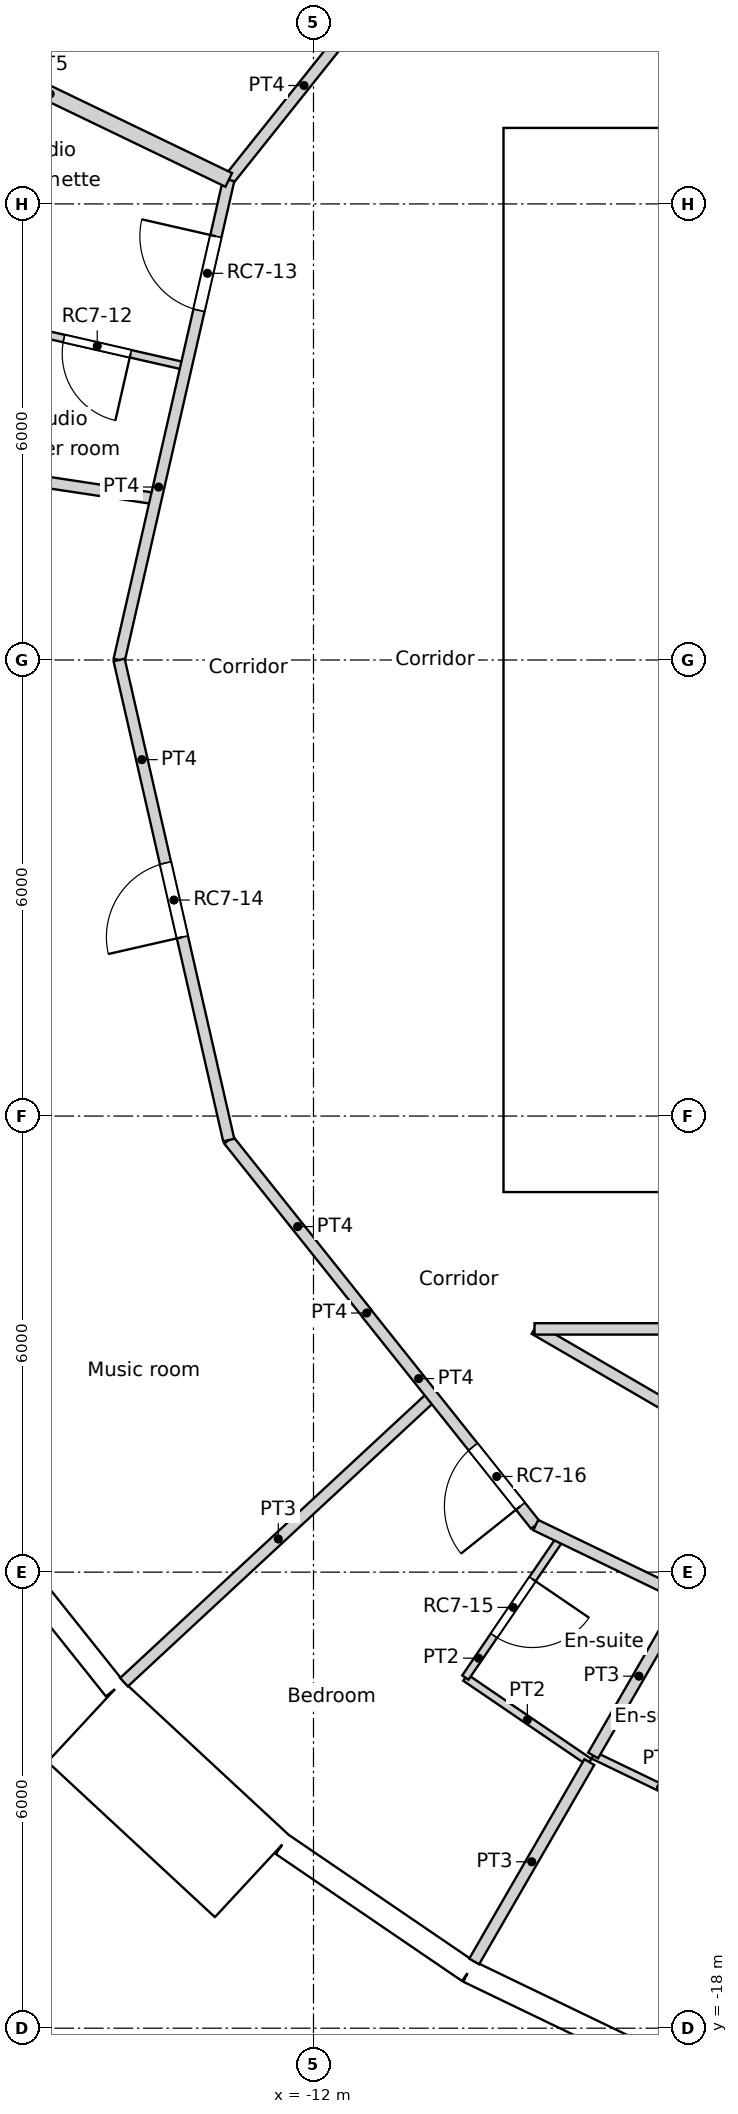
"""IFC4 building model, lengths in metres.
Left out: names, types, materials, properties, quantities, classifications, styles, units other than length and angle.
Written with IfcOpenShell. Run it as: python <this file> out.ifc"""

import sys

from ifc_helpers import new_model, si_unit, direction, frame, frame_2d, origin, origin_2d, place, context, subcontext, project, spatial, rectangle, circle, extrude, element, fill, save


model = new_model("IFC4")
c1 = context("Model", 3, precision=1e-05, world=origin(), true_north=direction((0.0, 1.0)))
c2 = subcontext(c1, "Body", "Model", "MODEL_VIEW")
j1 = project(units=[si_unit("LENGTHUNIT", "METRE"), si_unit("PLANEANGLEUNIT", "RADIAN")], contexts=[c1])
p1 = place(None, origin())
s1 = spatial("IfcSite", under=j1, at=p1, CompositionType="ELEMENT")
p2 = place(p1, origin())
s2 = spatial("IfcBuilding", under=s1, at=p2, CompositionType="ELEMENT")
p3 = place(p2, frame((0.0, 0.0, 294.6)))
s3 = spatial("IfcBuildingStorey", under=s2, at=p3, CompositionType="ELEMENT", Elevation=294.6)
for number, where, z_axis, x_axis in (
    (1, (-13.798, -12.802, 0.0), (0.0, 0.0, 1.0), (1.0, 0.0, 0.0)),
    (2, (-9.411, -16.301, 0.0), (0.0, 0.0, 1.0), (1.0, 0.0, 0.0)),
):
    element("IfcColumn", number, at=place(p3, frame(where, z_axis=z_axis, x_axis=x_axis)), inside=s3, PredefinedType="COLUMN", context=c2, shape_type="SweptSolid", body=[
        extrude(circle(Radius=0.45, at=origin_2d()), origin(), (0.0, 0.0, 1.0), 3.6),
    ])
p4 = place(p3, frame((-16.46, -11.222, 0.0), z_axis=(0.0, 0.0, 1.0), x_axis=(0.623498236992, -0.781824755599, 0.0)))
e3 = element("IfcWall", 3, at=p4, inside=s3, PredefinedType="SOLIDWALL", context=c2, shape_type="SweptSolid", body=[
    extrude(rectangle(XDim=2.962, YDim=0.3, at=frame_2d((1.481, 0.0))), origin(), (0.0, 0.0, 1.0), 3.25),
])
p5 = place(p4, frame((1.481, 0.0, 1.55)))
e4 = element("IfcOpeningElement", 4, at=p5, cuts=e3, PredefinedType="OPENING", context=c2, shape_type="SweptSolid", body=[
    extrude(circle(Radius=0.9, at=origin_2d()), frame((0.0, 0.16, 0.0), z_axis=(0.0, -1.0, 0.0), x_axis=(1.0, 0.0, 0.0)), (0.0, 0.0, 1.0), 0.32),
])
p6 = place(p3, frame((-15.003, -13.964, -0.35), z_axis=(0.0, 0.0, 1.0), x_axis=(0.733022439167, -0.680204457261, 0.0)))
e5 = element("IfcWall", 5, at=p6, inside=s3, PredefinedType="ELEMENTEDWALL", context=c2, shape_type="SweptSolid", body=[
    extrude(rectangle(XDim=3.0, YDim=1.45, at=frame_2d((1.5, 0.0))), origin(), (0.0, 0.0, 1.0), 3.6),
])
p7 = place(p6, frame((1.5, 0.0, 1.9)))
e6 = element("IfcOpeningElement", 6, at=p7, cuts=e5, PredefinedType="OPENING", context=c2, shape_type="SweptSolid", body=[
    extrude(circle(Radius=0.9, at=origin_2d()), frame((0.0, 0.735, 0.0), z_axis=(0.0, -1.0, 0.0), x_axis=(1.0, 0.0, 0.0)), (0.0, 0.0, 1.0), 1.47),
])
p8 = place(p3, frame((-12.408, -15.584, 0.0), z_axis=(0.0, 0.0, 1.0), x_axis=(0.826236061068, -0.563324037646, 0.0)))
e7 = element("IfcWall", 7, at=p8, inside=s3, PredefinedType="SOLIDWALL", context=c2, shape_type="SweptSolid", body=[
    extrude(rectangle(XDim=2.962, YDim=0.3, at=frame_2d((1.481, 0.0))), origin(), (0.0, 0.0, 1.0), 3.25),
])
p9 = place(p8, frame((1.481, 0.0, 1.55)))
e8 = element("IfcOpeningElement", 8, at=p9, cuts=e7, PredefinedType="OPENING", context=c2, shape_type="SweptSolid", body=[
    extrude(circle(Radius=0.9, at=origin_2d()), frame((0.0, 0.16, 0.0), z_axis=(0.0, -1.0, 0.0), x_axis=(1.0, 0.0, 0.0)), (0.0, 0.0, 1.0), 0.32),
])
p10 = place(p3, frame((-9.961, -17.253, 0.0), z_axis=(0.0, 0.0, 1.0), x_axis=(0.90095513435, -0.433912255978, 0.0)))
e9 = element("IfcWall", 9, at=p10, inside=s3, PredefinedType="SOLIDWALL", context=c2, shape_type="SweptSolid", body=[
    extrude(rectangle(XDim=2.962, YDim=0.3, at=frame_2d((1.481, 0.0))), origin(), (0.0, 0.0, 1.0), 3.25),
])
p11 = place(p10, frame((1.481, 0.0, 1.55)))
e10 = element("IfcOpeningElement", 10, at=p11, cuts=e9, PredefinedType="OPENING", context=c2, shape_type="SweptSolid", body=[
    extrude(circle(Radius=0.9, at=origin_2d()), frame((0.0, 0.16, 0.0), z_axis=(0.0, -1.0, 0.0), x_axis=(1.0, 0.0, 0.0)), (0.0, 0.0, 1.0), 0.32),
])
p12 = place(p3, frame((-9.5, -6.7, 0.0), z_axis=(0.0, 0.0, 1.0), x_axis=(1.0, 0.0, 0.0)))
e11 = element("IfcWall", 11, at=p12, inside=s3, PredefinedType="SOLIDWALL", context=c2, shape_type="SweptSolid", body=[
    extrude(rectangle(XDim=19.0, YDim=0.6, at=frame_2d((9.5, 0.0))), origin(), (0.0, 0.0, 1.0), 3.6),
])
p13 = place(p12, frame((10.4, 0.0, 0.0)))
e12 = element("IfcOpeningElement", 12, at=p13, cuts=e11, PredefinedType="OPENING", context=c2, shape_type="SweptSolid", body=[
    extrude(rectangle(XDim=1.0, YDim=2.1, at=frame_2d((0.5, 1.05))), frame((0.0, 0.3, 0.0), z_axis=(0.0, -1.0, 0.0), x_axis=(1.0, 0.0, 0.0)), (0.0, 0.0, 1.0), 0.6),
])
p14 = place(p12, frame((5.35, 0.0, 0.0)))
e13 = element("IfcOpeningElement", 13, at=p14, cuts=e11, PredefinedType="OPENING", context=c2, shape_type="SweptSolid", body=[
    extrude(rectangle(XDim=1.7, YDim=2.1, at=frame_2d((0.85, 1.05))), frame((0.0, 0.3, 0.0), z_axis=(0.0, -1.0, 0.0), x_axis=(1.0, 0.0, 0.0)), (0.0, 0.0, 1.0), 0.6),
])
p15 = place(p12, frame((11.95, 0.0, 0.0)))
e14 = element("IfcOpeningElement", 14, at=p15, cuts=e11, PredefinedType="OPENING", context=c2, shape_type="SweptSolid", body=[
    extrude(rectangle(XDim=1.7, YDim=2.1, at=frame_2d((0.85, 1.05))), frame((0.0, 0.3, 0.0), z_axis=(0.0, -1.0, 0.0), x_axis=(1.0, 0.0, 0.0)), (0.0, 0.0, 1.0), 0.6),
])
p16 = place(p3, frame((-9.5, 6.7, 0.0), z_axis=(0.0, 0.0, 1.0), x_axis=(1.0, 0.0, 0.0)))
e15 = element("IfcWall", 15, at=p16, inside=s3, PredefinedType="SOLIDWALL", context=c2, shape_type="SweptSolid", body=[
    extrude(rectangle(XDim=19.0, YDim=0.6, at=frame_2d((9.5, 0.0))), origin(), (0.0, 0.0, 1.0), 3.6),
])
p17 = place(p16, frame((5.35, 0.0, 0.0)))
e16 = element("IfcOpeningElement", 16, at=p17, cuts=e15, PredefinedType="OPENING", context=c2, shape_type="SweptSolid", body=[
    extrude(rectangle(XDim=1.7, YDim=2.1, at=frame_2d((0.85, 1.05))), frame((0.0, 0.3, 0.0), z_axis=(0.0, -1.0, 0.0), x_axis=(1.0, 0.0, 0.0)), (0.0, 0.0, 1.0), 0.6),
])
p18 = place(p3, frame((-9.2, -6.4, 0.0), z_axis=(0.0, 0.0, 1.0), x_axis=(0.0, 1.0, 0.0)))
e17 = element("IfcWall", 17, at=p18, inside=s3, PredefinedType="SOLIDWALL", context=c2, shape_type="SweptSolid", body=[
    extrude(rectangle(XDim=12.8, YDim=0.6, at=frame_2d((6.4, 0.0))), origin(), (0.0, 0.0, 1.0), 3.6),
])
p19 = place(p3, frame((-8.9, -3.1, 0.0), z_axis=(0.0, 0.0, 1.0), x_axis=(1.0, 0.0, 0.0)))
e18 = element("IfcWall", 18, at=p19, inside=s3, PredefinedType="SOLIDWALL", context=c2, shape_type="SweptSolid", body=[
    extrude(rectangle(XDim=9.6, YDim=0.3, at=frame_2d((4.8, 0.0))), origin(), (0.0, 0.0, 1.0), 3.25),
])
p20 = place(p19, frame((4.75, 0.0, 0.0)))
e19 = element("IfcOpeningElement", 19, at=p20, cuts=e18, PredefinedType="OPENING", context=c2, shape_type="SweptSolid", body=[
    extrude(rectangle(XDim=1.7, YDim=2.1, at=frame_2d((0.85, 1.05))), frame((0.0, 0.15, 0.0), z_axis=(0.0, -1.0, 0.0), x_axis=(1.0, 0.0, 0.0)), (0.0, 0.0, 1.0), 0.3),
])
p21 = place(p3, frame((-8.9, 3.1, 0.0), z_axis=(0.0, 0.0, 1.0), x_axis=(1.0, 0.0, 0.0)))
e20 = element("IfcWall", 20, at=p21, inside=s3, PredefinedType="SOLIDWALL", context=c2, shape_type="SweptSolid", body=[
    extrude(rectangle(XDim=4.55, YDim=0.3, at=frame_2d((2.275, 0.0))), origin(), (0.0, 0.0, 1.0), 3.25),
])
p22 = place(p3, frame((-8.9, 0.0, 0.0), z_axis=(0.0, 0.0, 1.0), x_axis=(1.0, 0.0, 0.0)))
e21 = element("IfcWall", 21, at=p22, inside=s3, PredefinedType="SOLIDWALL", context=c2, shape_type="SweptSolid", body=[
    extrude(rectangle(XDim=3.0, YDim=0.3, at=frame_2d((1.5, 0.0))), origin(), (0.0, 0.0, 1.0), 3.25),
])
p23 = place(p3, frame((-9.092, -8.8, 0.0), z_axis=(0.0, 0.0, 1.0), x_axis=(1.0, 0.0, 0.0)))
e22 = element("IfcWall", 22, at=p23, inside=s3, PredefinedType="PARTITIONING", context=c2, shape_type="SweptSolid", body=[
    extrude(rectangle(XDim=10.016, YDim=0.15, at=frame_2d((5.008, 0.0))), origin(), (0.0, 0.0, 1.0), 3.25),
])
p24 = place(p23, frame((4.508, 0.0, 0.0)))
e23 = element("IfcOpeningElement", 23, at=p24, cuts=e22, PredefinedType="OPENING", context=c2, shape_type="SweptSolid", body=[
    extrude(rectangle(XDim=1.0, YDim=2.04, at=frame_2d((0.5, 1.02))), frame((0.0, 0.075, 0.0), z_axis=(0.0, -1.0, 0.0), x_axis=(1.0, 0.0, 0.0)), (0.0, 0.0, 1.0), 0.15),
])
p25 = place(p3, frame((-9.092, -8.8, 0.0), z_axis=(0.0, 0.0, 1.0), x_axis=(0.864470922103, -0.502682827277, 0.0)))
e24 = element("IfcWall", 24, at=p25, inside=s3, PredefinedType="PARTITIONING", context=c2, shape_type="SweptSolid", body=[
    extrude(rectangle(XDim=6.735, YDim=0.15, at=frame_2d((3.368, 0.0))), origin(), (0.0, 0.0, 1.0), 3.25),
])
p26 = place(p3, frame((-11.3, -8.596, 0.0), z_axis=(0.0, 0.0, 1.0), x_axis=(0.623390921228, -0.781910326911, 0.0)))
e25 = element("IfcWall", 25, at=p26, inside=s3, PredefinedType="PARTITIONING", context=c2, shape_type="SweptSolid", body=[
    extrude(rectangle(XDim=3.564, YDim=0.15, at=frame_2d((1.782, 0.0))), origin(), (0.0, 0.0, 1.0), 3.25),
])
p27 = place(p26, frame((2.244, 0.0, 0.0)))
e26 = element("IfcOpeningElement", 26, at=p27, cuts=e25, PredefinedType="OPENING", context=c2, shape_type="SweptSolid", body=[
    extrude(rectangle(XDim=1.0, YDim=2.1, at=frame_2d((0.5, 1.05))), frame((0.0, 0.075, 0.0), z_axis=(0.0, -1.0, 0.0), x_axis=(1.0, 0.0, 0.0)), (0.0, 0.0, 1.0), 0.15),
])
p28 = place(p3, frame((-11.3, -8.596, 0.0), z_axis=(0.0, 0.0, 1.0), x_axis=(0.0, 1.0, 0.0)))
e27 = element("IfcWall", 27, at=p28, inside=s3, PredefinedType="PARTITIONING", context=c2, shape_type="SweptSolid", body=[
    extrude(rectangle(XDim=0.01, YDim=0.15, at=frame_2d((0.005, 0.0))), origin(), (0.0, 0.0, 1.0), 3.25),
])
p29 = place(p3, frame((-13.115, 6.316, 0.0), z_axis=(0.0, 0.0, 1.0), x_axis=(0.623476099415, 0.781842409606, 0.0)))
e28 = element("IfcWall", 28, at=p29, inside=s3, PredefinedType="PARTITIONING", context=c2, shape_type="SweptSolid", body=[
    extrude(rectangle(XDim=3.177, YDim=0.15, at=frame_2d((1.589, 0.0))), origin(), (0.0, 0.0, 1.0), 3.25),
])
p30 = place(p3, frame((-14.557, 0.0, 0.0), z_axis=(0.0, 0.0, 1.0), x_axis=(0.222533159771, 0.974925121639, 0.0)))
e29 = element("IfcWall", 29, at=p30, inside=s3, PredefinedType="PARTITIONING", context=c2, shape_type="SweptSolid", body=[
    extrude(rectangle(XDim=6.478, YDim=0.15, at=frame_2d((3.239, 0.0))), origin(), (0.0, 0.0, 1.0), 3.25),
])
p31 = place(p30, frame((4.718, 0.0, 0.0)))
e30 = element("IfcOpeningElement", 30, at=p31, cuts=e29, PredefinedType="OPENING", context=c2, shape_type="SweptSolid", body=[
    extrude(rectangle(XDim=1.0, YDim=2.1, at=frame_2d((0.5, 1.05))), frame((0.0, 0.075, 0.0), z_axis=(0.0, -1.0, 0.0), x_axis=(1.0, 0.0, 0.0)), (0.0, 0.0, 1.0), 0.15),
])
p32 = place(p3, frame((-13.115, -6.316, 0.0), z_axis=(0.0, 0.0, 1.0), x_axis=(0.623446514299, -0.781866001185, 0.0)))
e31 = element("IfcWall", 31, at=p32, inside=s3, PredefinedType="PARTITIONING", context=c2, shape_type="SweptSolid", body=[
    extrude(rectangle(XDim=2.911, YDim=0.15, at=frame_2d((1.456, 0.0))), origin(), (0.0, 0.0, 1.0), 3.25),
])
p33 = place(p3, frame((-14.557, 0.0, 0.0), z_axis=(0.0, 0.0, 1.0), x_axis=(0.222568978642, -0.97491694505, 0.0)))
e32 = element("IfcWall", 32, at=p33, inside=s3, PredefinedType="PARTITIONING", context=c2, shape_type="SweptSolid", body=[
    extrude(rectangle(XDim=6.479, YDim=0.15, at=frame_2d((3.239, 0.0))), origin(), (0.0, 0.0, 1.0), 3.25),
])
p34 = place(p33, frame((2.74, 0.0, 0.0)))
e33 = element("IfcOpeningElement", 33, at=p34, cuts=e32, PredefinedType="OPENING", context=c2, shape_type="SweptSolid", body=[
    extrude(rectangle(XDim=1.0, YDim=2.04, at=frame_2d((0.5, 1.02))), frame((0.0, 0.075, 0.0), z_axis=(0.0, -1.0, 0.0), x_axis=(1.0, 0.0, 0.0)), (0.0, 0.0, 1.0), 0.15),
])
p35 = place(p3, frame((-9.076, -11.381, 0.0), z_axis=(0.0, 0.0, 1.0), x_axis=(0.900778421649, -0.434278983018, 0.0)))
e34 = element("IfcWall", 34, at=p35, inside=s3, PredefinedType="PARTITIONING", context=c2, shape_type="SweptSolid", body=[
    extrude(rectangle(XDim=6.479, YDim=0.15, at=frame_2d((3.239, 0.0))), origin(), (0.0, 0.0, 1.0), 3.25),
])
p36 = place(p35, frame((4.719, 0.0, 0.0)))
e35 = element("IfcOpeningElement", 35, at=p36, cuts=e34, PredefinedType="OPENING", context=c2, shape_type="SweptSolid", body=[
    extrude(rectangle(XDim=1.0, YDim=2.1, at=frame_2d((0.5, 1.05))), frame((0.0, 0.075, 0.0), z_axis=(0.0, -1.0, 0.0), x_axis=(1.0, 0.0, 0.0)), (0.0, 0.0, 1.0), 0.15),
])
p37 = place(p3, frame((-17.813, 8.578, 0.0), z_axis=(0.0, 0.0, 1.0), x_axis=(0.901022681876, -0.433771975518, 0.0)))
e36 = element("IfcWall", 36, at=p37, inside=s3, PredefinedType="PARTITIONING", context=c2, shape_type="SweptSolid", body=[
    extrude(rectangle(XDim=5.214, YDim=0.2, at=frame_2d((2.607, 0.0))), origin(), (0.0, 0.0, 1.0), 3.25),
])
p38 = place(p3, frame((-16.015, 4.396, 0.0), z_axis=(0.0, 0.0, 1.0), x_axis=(0.97493862442, -0.222473995368, 0.0)))
e37 = element("IfcWall", 37, at=p38, inside=s3, PredefinedType="PARTITIONING", context=c2, shape_type="SweptSolid", body=[
    extrude(rectangle(XDim=2.4, YDim=0.1, at=frame_2d((1.2, 0.0))), origin(), (0.0, 0.0, 1.0), 3.25),
])
p39 = place(p38, frame((0.75, 0.0, 0.0)))
e38 = element("IfcOpeningElement", 38, at=p39, cuts=e37, PredefinedType="OPENING", context=c2, shape_type="SweptSolid", body=[
    extrude(rectangle(XDim=0.9, YDim=2.04, at=frame_2d((0.45, 1.02))), frame((0.0, 0.05, 0.0), z_axis=(0.0, -1.0, 0.0), x_axis=(1.0, 0.0, 0.0)), (0.0, 0.0, 1.0), 0.1),
])
p40 = place(p3, frame((-19.551, 2.947, 0.0), z_axis=(0.0, 0.0, 1.0), x_axis=(0.988837218495, -0.148999850064, 0.0)))
e39 = element("IfcWall", 39, at=p40, inside=s3, PredefinedType="PARTITIONING", context=c2, shape_type="SweptSolid", body=[
    extrude(rectangle(XDim=5.54, YDim=0.15, at=frame_2d((2.77, 0.0))), origin(), (0.0, 0.0, 1.0), 3.25),
])
p41 = place(p3, frame((-14.493, -13.448, 0.0), z_axis=(0.0, 0.0, 1.0), x_axis=(0.73295202722, 0.68028032883, 0.0)))
e40 = element("IfcWall", 40, at=p41, inside=s3, PredefinedType="PARTITIONING", context=c2, shape_type="SweptSolid", body=[
    extrude(rectangle(XDim=5.539, YDim=0.15, at=frame_2d((2.77, 0.0))), origin(), (0.0, 0.0, 1.0), 3.25),
])
p42 = place(p3, frame((-10.002, -13.387, 0.0), z_axis=(0.0, 0.0, 1.0), x_axis=(0.563469042551, 0.826137178734, 0.0)))
e41 = element("IfcWall", 41, at=p42, inside=s3, PredefinedType="PARTITIONING", context=c2, shape_type="SweptSolid", body=[
    extrude(rectangle(XDim=2.234, YDim=0.1, at=frame_2d((1.117, 0.0))), origin(), (0.0, 0.0, 1.0), 3.25),
])
p43 = place(p42, frame((0.667, 0.0, 0.0)))
e42 = element("IfcOpeningElement", 42, at=p43, cuts=e41, PredefinedType="OPENING", context=c2, shape_type="SweptSolid", body=[
    extrude(rectangle(XDim=0.9, YDim=2.04, at=frame_2d((0.45, 1.02))), frame((0.0, 0.05, 0.0), z_axis=(0.0, -1.0, 0.0), x_axis=(1.0, 0.0, 0.0)), (0.0, 0.0, 1.0), 0.1),
])
p44 = place(p3, frame((-10.002, -13.387, 0.0), z_axis=(0.0, 0.0, 1.0), x_axis=(0.82620117489, -0.563375202339, 0.0)))
e43 = element("IfcWall", 43, at=p44, inside=s3, PredefinedType="PARTITIONING", context=c2, shape_type="SweptSolid", body=[
    extrude(rectangle(XDim=1.974, YDim=0.1, at=frame_2d((0.987, 0.0))), origin(), (0.0, 0.0, 1.0), 3.25),
])
p45 = place(p3, frame((-9.886, -17.122, 0.0), z_axis=(0.0, 0.0, 1.0), x_axis=(0.500117793536, 0.865957384972, 0.0)))
e44 = element("IfcWall", 44, at=p45, inside=s3, PredefinedType="PARTITIONING", context=c2, shape_type="SweptSolid", body=[
    extrude(rectangle(XDim=3.029, YDim=0.15, at=frame_2d((1.515, 0.0))), origin(), (0.0, 0.0, 1.0), 3.25),
])
p46 = place(p3, frame((-8.321, -14.412, 0.0), z_axis=(0.0, 0.0, 1.0), x_axis=(0.500017667814, 0.866015203027, 0.0)))
e45 = element("IfcWall", 45, at=p46, inside=s3, PredefinedType="PARTITIONING", context=c2, shape_type="SweptSolid", body=[
    extrude(rectangle(XDim=2.41, YDim=0.15, at=frame_2d((1.205, 0.0))), origin(), (0.0, 0.0, 1.0), 3.25),
])
p47 = place(p3, frame((-8.319, -14.409, 0.0), z_axis=(0.0, 0.0, 1.0), x_axis=(0.900936932599, -0.433950047216, 0.0)))
e46 = element("IfcWall", 46, at=p47, inside=s3, PredefinedType="PARTITIONING", context=c2, shape_type="SweptSolid", body=[
    extrude(rectangle(XDim=1.966, YDim=0.1, at=frame_2d((0.983, 0.0))), origin(), (0.0, 0.0, 1.0), 3.25),
])
p48 = place(p5, origin())
e47 = element("IfcWindow", 47, at=p48, inside=s3, PartitioningType="SINGLE_PANEL", PredefinedType="WINDOW", context=c2, shape_type="SweptSolid", body=[
    extrude(circle(Radius=0.9, at=origin_2d()), frame((0.0, 0.12, 0.0), z_axis=(0.0, -1.0, 0.0), x_axis=(1.0, 0.0, 0.0)), (0.0, 0.0, 1.0), 0.1),
])
fill(e4, e47)
p49 = place(p7, origin())
e48 = element("IfcWindow", 48, at=p49, inside=s3, PartitioningType="SINGLE_PANEL", PredefinedType="WINDOW", context=c2, shape_type="SweptSolid", body=[
    extrude(circle(Radius=0.9, at=origin_2d()), frame((0.0, 0.695, 0.0), z_axis=(0.0, -1.0, 0.0), x_axis=(1.0, 0.0, 0.0)), (0.0, 0.0, 1.0), 0.1),
])
fill(e6, e48)
p50 = place(p9, origin())
e49 = element("IfcWindow", 49, at=p50, inside=s3, PartitioningType="SINGLE_PANEL", PredefinedType="WINDOW", context=c2, shape_type="SweptSolid", body=[
    extrude(circle(Radius=0.9, at=origin_2d()), frame((0.0, 0.12, 0.0), z_axis=(0.0, -1.0, 0.0), x_axis=(1.0, 0.0, 0.0)), (0.0, 0.0, 1.0), 0.1),
])
fill(e8, e49)
p51 = place(p11, origin())
e50 = element("IfcWindow", 50, at=p51, inside=s3, PartitioningType="SINGLE_PANEL", PredefinedType="WINDOW", context=c2, shape_type="SweptSolid", body=[
    extrude(circle(Radius=0.9, at=origin_2d()), frame((0.0, 0.12, 0.0), z_axis=(0.0, -1.0, 0.0), x_axis=(1.0, 0.0, 0.0)), (0.0, 0.0, 1.0), 0.1),
])
fill(e10, e50)
p52 = place(p39, origin())
e51 = element("IfcDoor", 51, at=p52, inside=s3, OperationType="SINGLE_SWING_LEFT", PredefinedType="DOOR", context=c2, shape_type="SweptSolid", body=[
    extrude(rectangle(XDim=0.9, YDim=2.04, at=frame_2d((0.45, 1.02))), frame((0.0, 0.025, 0.0), z_axis=(0.0, -1.0, 0.0), x_axis=(1.0, 0.0, 0.0)), (0.0, 0.0, 1.0), 0.05),
])
fill(e38, e51)
p53 = place(p31, origin())
e52 = element("IfcDoor", 52, at=p53, inside=s3, OperationType="SINGLE_SWING_RIGHT", PredefinedType="DOOR", context=c2, shape_type="SweptSolid", body=[
    extrude(rectangle(XDim=1.0, YDim=2.1, at=frame_2d((0.5, 1.05))), frame((0.0, 0.025, 0.0), z_axis=(0.0, -1.0, 0.0), x_axis=(1.0, 0.0, 0.0)), (0.0, 0.0, 1.0), 0.05),
])
fill(e30, e52)
p54 = place(p34, origin())
e53 = element("IfcDoor", 53, at=p54, inside=s3, OperationType="SINGLE_SWING_LEFT", PredefinedType="DOOR", context=c2, shape_type="SweptSolid", body=[
    extrude(rectangle(XDim=1.0, YDim=2.04, at=frame_2d((0.5, 1.02))), frame((0.0, 0.025, 0.0), z_axis=(0.0, -1.0, 0.0), x_axis=(1.0, 0.0, 0.0)), (0.0, 0.0, 1.0), 0.05),
])
fill(e33, e53)
p55 = place(p43, origin())
e54 = element("IfcDoor", 54, at=p55, inside=s3, OperationType="SINGLE_SWING_LEFT", PredefinedType="DOOR", context=c2, shape_type="SweptSolid", body=[
    extrude(rectangle(XDim=0.9, YDim=2.04, at=frame_2d((0.45, 1.02))), frame((0.0, 0.025, 0.0), z_axis=(0.0, -1.0, 0.0), x_axis=(1.0, 0.0, 0.0)), (0.0, 0.0, 1.0), 0.05),
])
fill(e42, e54)
p56 = place(p27, origin())
e55 = element("IfcDoor", 55, at=p56, inside=s3, OperationType="SINGLE_SWING_LEFT", PredefinedType="DOOR", context=c2, shape_type="SweptSolid", body=[
    extrude(rectangle(XDim=1.0, YDim=2.1, at=frame_2d((0.5, 1.05))), frame((0.0, 0.025, 0.0), z_axis=(0.0, -1.0, 0.0), x_axis=(1.0, 0.0, 0.0)), (0.0, 0.0, 1.0), 0.05),
])
fill(e26, e55)
save(model, sys.argv[1])
